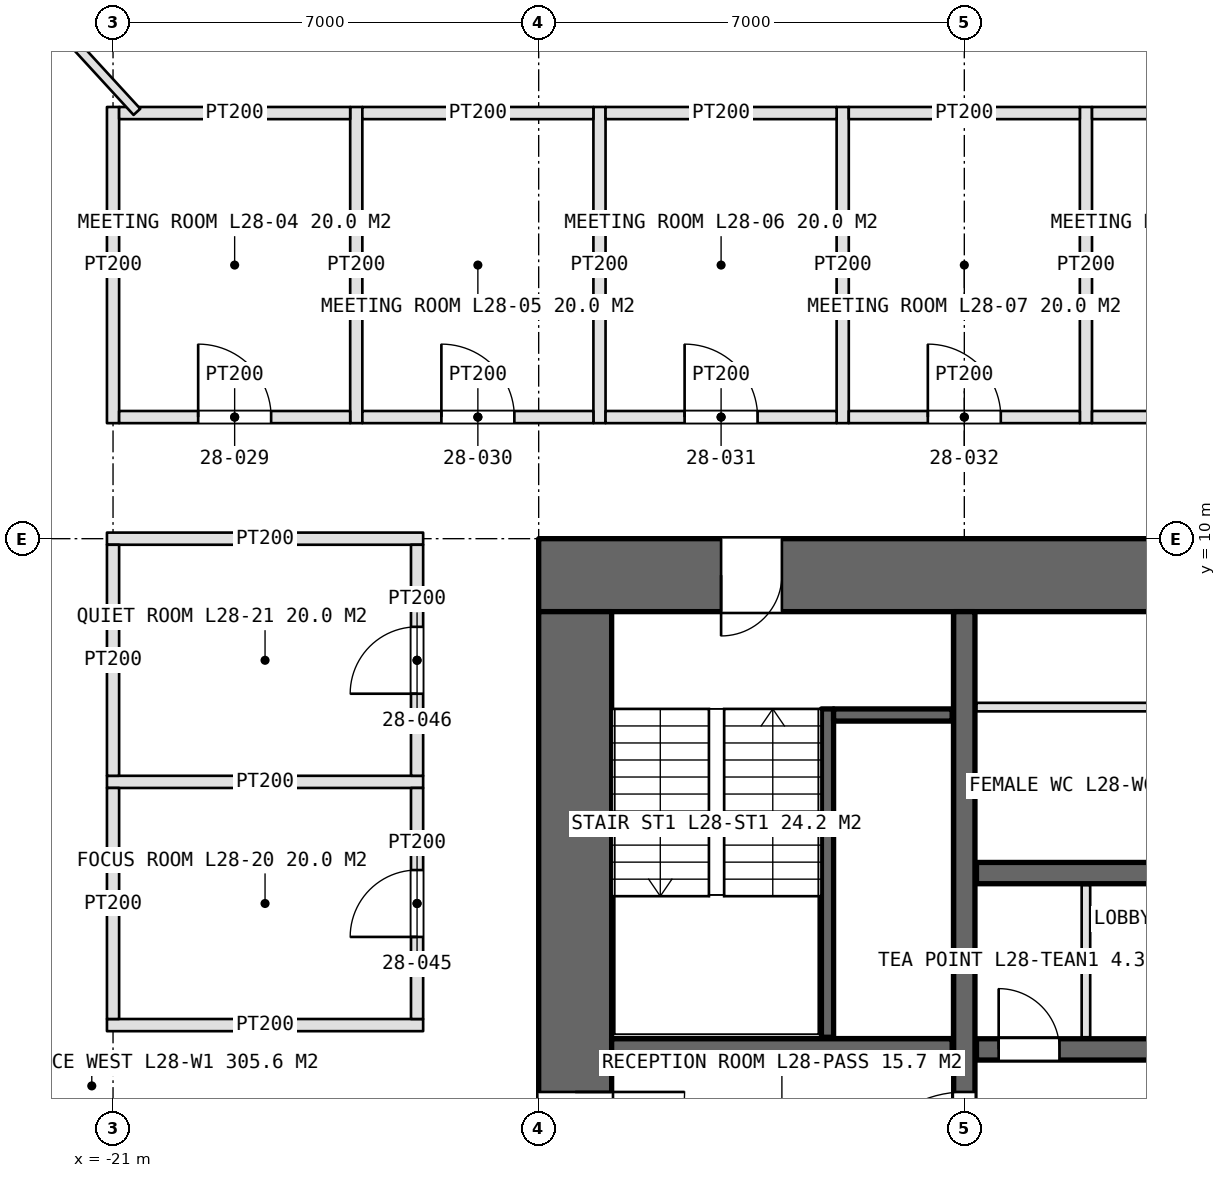
"""IFC4 building model, lengths in metres.
Left out: names, types, materials, properties, quantities, classifications, styles, units other than length and angle.
Written with IfcOpenShell. Run it as: python <this file> out.ifc"""

import sys

from ifc_helpers import new_model, si_unit, direction, frame, frame_2d, origin, place, context, subcontext, project, spatial, rectangle, extrude, element, fill, save


model = new_model("IFC4")
c1 = context("Model", 3, precision=1e-05, world=origin(), true_north=direction((0.0, 1.0)))
c2 = subcontext(c1, "Body", "Model", "MODEL_VIEW")
j1 = project(units=[si_unit("LENGTHUNIT", "METRE"), si_unit("PLANEANGLEUNIT", "RADIAN")], contexts=[c1])
p1 = place(None, origin())
s1 = spatial("IfcSite", under=j1, at=p1, CompositionType="ELEMENT")
p2 = place(p1, origin())
s2 = spatial("IfcBuilding", under=s1, at=p2, CompositionType="ELEMENT")
p3 = place(p2, frame((0.0, 0.0, 134.4)))
s3 = spatial("IfcBuildingStorey", under=s2, at=p3, CompositionType="ELEMENT", Elevation=134.4)
p4 = place(p3, frame((14.0, 9.4, 0.0), z_axis=(0.0, 0.0, 1.0), x_axis=(-1.0, 0.0, 0.0)))
e1 = element("IfcWall", 1, at=p4, inside=s3, PredefinedType="SHEAR", context=c2, shape_type="SweptSolid", body=[
    extrude(rectangle(XDim=28.0, YDim=1.2, at=frame_2d((14.0, 0.0))), origin(), (0.0, 0.0, 1.0), 4.2),
])
p5 = place(p4, frame((24.0, 0.0, 0.0)))
e2 = element("IfcOpeningElement", 2, at=p5, cuts=e1, PredefinedType="OPENING", context=c2, shape_type="SweptSolid", body=[
    extrude(rectangle(XDim=1.0, YDim=2.4, at=frame_2d((0.5, 1.2))), frame((0.0, 0.61, 0.0), z_axis=(0.0, -1.0, 0.0), x_axis=(1.0, 0.0, 0.0)), (0.0, 0.0, 1.0), 1.22),
])
p6 = place(p4, frame((13.1, 0.0, 0.0)))
e3 = element("IfcOpeningElement", 3, at=p6, cuts=e1, PredefinedType="OPENING", context=c2, shape_type="SweptSolid", body=[
    extrude(rectangle(XDim=1.8, YDim=2.4, at=frame_2d((0.9, 1.2))), frame((0.0, 0.61, 0.0), z_axis=(0.0, -1.0, 0.0), x_axis=(1.0, 0.0, 0.0)), (0.0, 0.0, 1.0), 1.22),
])
p7 = place(p3, frame((-13.4, 8.8, 0.0), z_axis=(0.0, 0.0, 1.0), x_axis=(0.0, -1.0, 0.0)))
e4 = element("IfcWall", 4, at=p7, inside=s3, PredefinedType="SHEAR", context=c2, shape_type="SweptSolid", body=[
    extrude(rectangle(XDim=17.6, YDim=1.2, at=frame_2d((8.8, 0.0))), origin(), (0.0, 0.0, 1.0), 4.2),
])
p8 = place(p7, frame((7.9, 0.0, 0.0)))
e5 = element("IfcOpeningElement", 5, at=p8, cuts=e4, PredefinedType="OPENING", context=c2, shape_type="SweptSolid", body=[
    extrude(rectangle(XDim=1.8, YDim=2.4, at=frame_2d((0.9, 1.2))), frame((0.0, 0.61, 0.0), z_axis=(0.0, -1.0, 0.0), x_axis=(1.0, 0.0, 0.0)), (0.0, 0.0, 1.0), 1.22),
])
p9 = place(p7, frame((16.5, 0.0, 0.0)))
e6 = element("IfcOpeningElement", 6, at=p9, cuts=e4, PredefinedType="OPENING", context=c2, shape_type="SweptSolid", body=[
    extrude(rectangle(XDim=1.0, YDim=2.4, at=frame_2d((0.5, 1.2))), frame((0.0, 0.61, 0.0), z_axis=(0.0, -1.0, 0.0), x_axis=(1.0, 0.0, 0.0)), (0.0, 0.0, 1.0), 1.22),
])
p10 = place(p3, frame((-7.0, -8.8, 0.0), z_axis=(0.0, 0.0, 1.0), x_axis=(0.0, 1.0, 0.0)))
e7 = element("IfcWall", 7, at=p10, inside=s3, PredefinedType="SHEAR", context=c2, shape_type="SweptSolid", body=[
    extrude(rectangle(XDim=17.6, YDim=0.35, at=frame_2d((8.8, 0.0))), origin(), (0.0, 0.0, 1.0), 4.2),
])
p11 = place(p10, frame((7.9, 0.0, 0.0)))
e8 = element("IfcOpeningElement", 8, at=p11, cuts=e7, PredefinedType="OPENING", context=c2, shape_type="SweptSolid", body=[
    extrude(rectangle(XDim=1.8, YDim=2.4, at=frame_2d((0.9, 1.2))), frame((0.0, 0.185, 0.0), z_axis=(0.0, -1.0, 0.0), x_axis=(1.0, 0.0, 0.0)), (0.0, 0.0, 1.0), 0.37),
])
p12 = place(p3, frame((-6.8, 1.6, 0.0), z_axis=(0.0, 0.0, 1.0), x_axis=(1.0, 0.0, 0.0)))
e9 = element("IfcWall", 9, at=p12, inside=s3, PredefinedType="SHEAR", context=c2, shape_type="SweptSolid", body=[
    extrude(rectangle(XDim=13.6, YDim=0.35, at=frame_2d((6.8, 0.0))), origin(), (0.0, 0.0, 1.0), 4.2),
])
p13 = place(p12, frame((0.365, 0.0, 0.0)))
e10 = element("IfcOpeningElement", 10, at=p13, cuts=e9, PredefinedType="OPENING", context=c2, shape_type="SweptSolid", body=[
    extrude(rectangle(XDim=1.0, YDim=2.4, at=frame_2d((0.5, 1.2))), frame((0.0, 0.185, 0.0), z_axis=(0.0, -1.0, 0.0), x_axis=(1.0, 0.0, 0.0)), (0.0, 0.0, 1.0), 0.37),
])
p14 = place(p12, frame((4.15, 0.0, 0.0)))
e11 = element("IfcOpeningElement", 11, at=p14, cuts=e9, PredefinedType="OPENING", context=c2, shape_type="SweptSolid", body=[
    extrude(rectangle(XDim=0.9, YDim=2.4, at=frame_2d((0.45, 1.2))), frame((0.0, 0.185, 0.0), z_axis=(0.0, -1.0, 0.0), x_axis=(1.0, 0.0, 0.0)), (0.0, 0.0, 1.0), 0.37),
])
p15 = place(p12, frame((8.635, 0.0, 0.0)))
e12 = element("IfcOpeningElement", 12, at=p15, cuts=e9, PredefinedType="OPENING", context=c2, shape_type="SweptSolid", body=[
    extrude(rectangle(XDim=1.0, YDim=2.4, at=frame_2d((0.5, 1.2))), frame((0.0, 0.185, 0.0), z_axis=(0.0, -1.0, 0.0), x_axis=(1.0, 0.0, 0.0)), (0.0, 0.0, 1.0), 0.37),
])
p16 = place(p3, frame((-6.8, 4.5, 0.0), z_axis=(0.0, 0.0, 1.0), x_axis=(1.0, 0.0, 0.0)))
e13 = element("IfcWall", 13, at=p16, inside=s3, PredefinedType="SHEAR", context=c2, shape_type="SweptSolid", body=[
    extrude(rectangle(XDim=13.6, YDim=0.35, at=frame_2d((6.8, 0.0))), origin(), (0.0, 0.0, 1.0), 4.2),
])
p17 = place(p3, frame((-12.8, 1.6, 0.0), z_axis=(0.0, 0.0, 1.0), x_axis=(1.0, 0.0, 0.0)))
e14 = element("IfcWall", 14, at=p17, inside=s3, PredefinedType="SHEAR", context=c2, shape_type="SweptSolid", body=[
    extrude(rectangle(XDim=5.6, YDim=0.35, at=frame_2d((2.8, 0.0))), origin(), (0.0, 0.0, 1.0), 4.2),
])
p18 = place(p3, frame((-6.8, 7.23, 0.0), z_axis=(0.0, 0.0, 1.0), x_axis=(1.0, 0.0, 0.0)))
e15 = element("IfcWall", 15, at=p18, inside=s3, PredefinedType="PARTITIONING", context=c2, shape_type="SweptSolid", body=[
    extrude(rectangle(XDim=13.6, YDim=0.14, at=frame_2d((6.8, 0.0))), origin(), (0.0, 0.0, 1.0), 3.95),
])
p19 = place(p18, frame((3.28, 0.0, 0.0)))
e16 = element("IfcOpeningElement", 16, at=p19, cuts=e15, PredefinedType="OPENING", context=c2, shape_type="SweptSolid", body=[
    extrude(rectangle(XDim=1.0, YDim=2.4, at=frame_2d((0.5, 1.2))), frame((0.0, 0.08, 0.0), z_axis=(0.0, -1.0, 0.0), x_axis=(1.0, 0.0, 0.0)), (0.0, 0.0, 1.0), 0.16),
])
p20 = place(p18, frame((8.08, 0.0, 0.0)))
e17 = element("IfcOpeningElement", 17, at=p20, cuts=e15, PredefinedType="OPENING", context=c2, shape_type="SweptSolid", body=[
    extrude(rectangle(XDim=1.0, YDim=2.4, at=frame_2d((0.5, 1.2))), frame((0.0, 0.08, 0.0), z_axis=(0.0, -1.0, 0.0), x_axis=(1.0, 0.0, 0.0)), (0.0, 0.0, 1.0), 0.16),
])
p21 = place(p18, frame((12.25, 0.0, 0.0)))
e18 = element("IfcOpeningElement", 18, at=p21, cuts=e15, PredefinedType="OPENING", context=c2, shape_type="SweptSolid", body=[
    extrude(rectangle(XDim=1.1, YDim=2.4, at=frame_2d((0.55, 1.2))), frame((0.0, 0.08, 0.0), z_axis=(0.0, -1.0, 0.0), x_axis=(1.0, 0.0, 0.0)), (0.0, 0.0, 1.0), 0.16),
])
p22 = place(p3, frame((-5.0, 1.8, 0.0), z_axis=(0.0, 0.0, 1.0), x_axis=(0.0, 1.0, 0.0)))
e19 = element("IfcWall", 19, at=p22, inside=s3, PredefinedType="PARTITIONING", context=c2, shape_type="SweptSolid", body=[
    extrude(rectangle(XDim=2.5, YDim=0.14, at=frame_2d((1.25, 0.0))), origin(), (0.0, 0.0, 1.0), 3.95),
])
p23 = place(p3, frame((-9.25, 7.2, 0.0), z_axis=(0.0, 0.0, 1.0), x_axis=(0.0, -1.0, 0.0)))
e20 = element("IfcWall", 20, at=p23, inside=s3, PredefinedType="SOLIDWALL", context=c2, shape_type="SweptSolid", body=[
    extrude(rectangle(XDim=5.4, YDim=0.2, at=frame_2d((2.7, 0.0))), origin(), (0.0, 0.0, 1.0), 4.2),
])
p24 = place(p3, frame((-9.15, 7.1, 0.0), z_axis=(0.0, 0.0, 1.0), x_axis=(1.0, 0.0, 0.0)))
e21 = element("IfcWall", 21, at=p24, inside=s3, PredefinedType="SOLIDWALL", context=c2, shape_type="SweptSolid", body=[
    extrude(rectangle(XDim=1.95, YDim=0.2, at=frame_2d((0.975, 0.0))), origin(), (0.0, 0.0, 1.0), 4.2),
])
for number, where, z_axis, x_axis in (
    (22, (-21.0, 11.9, 0.0), (0.0, 0.0, 1.0), (0.0, 1.0, 0.0)),
    (23, (-17.0, 11.9, 0.0), (0.0, 0.0, 1.0), (0.0, 1.0, 0.0)),
    (24, (-13.0, 11.9, 0.0), (0.0, 0.0, 1.0), (0.0, 1.0, 0.0)),
    (25, (-9.0, 11.9, 0.0), (0.0, 0.0, 1.0), (0.0, 1.0, 0.0)),
    (26, (-5.0, 11.9, 0.0), (0.0, 0.0, 1.0), (0.0, 1.0, 0.0)),
):
    element("IfcWall", number, at=place(p3, frame(where, z_axis=z_axis, x_axis=x_axis)), inside=s3, PredefinedType="PARTITIONING", context=c2, shape_type="SweptSolid", body=[
        extrude(rectangle(XDim=5.2, YDim=0.2, at=frame_2d((2.6, 0.0))), origin(), (0.0, 0.0, 1.0), 3.0),
    ])
p25 = place(p3, frame((-20.9, 12.0, 0.0), z_axis=(0.0, 0.0, 1.0), x_axis=(1.0, 0.0, 0.0)))
e27 = element("IfcWall", 27, at=p25, inside=s3, PredefinedType="PARTITIONING", context=c2, shape_type="SweptSolid", body=[
    extrude(rectangle(XDim=3.8, YDim=0.2, at=frame_2d((1.9, 0.0))), origin(), (0.0, 0.0, 1.0), 3.0),
])
p26 = place(p25, frame((1.3, 0.0, 0.0)))
e28 = element("IfcOpeningElement", 28, at=p26, cuts=e27, PredefinedType="OPENING", context=c2, shape_type="SweptSolid", body=[
    extrude(rectangle(XDim=1.2, YDim=2.4, at=frame_2d((0.6, 1.2))), frame((0.0, 0.11, 0.0), z_axis=(0.0, -1.0, 0.0), x_axis=(1.0, 0.0, 0.0)), (0.0, 0.0, 1.0), 0.22),
])
p27 = place(p3, frame((-20.9, 17.0, 0.0), z_axis=(0.0, 0.0, 1.0), x_axis=(1.0, 0.0, 0.0)))
e29 = element("IfcWall", 29, at=p27, inside=s3, PredefinedType="PARTITIONING", context=c2, shape_type="SweptSolid", body=[
    extrude(rectangle(XDim=3.8, YDim=0.2, at=frame_2d((1.9, 0.0))), origin(), (0.0, 0.0, 1.0), 3.0),
])
p28 = place(p3, frame((-16.9, 12.0, 0.0), z_axis=(0.0, 0.0, 1.0), x_axis=(1.0, 0.0, 0.0)))
e30 = element("IfcWall", 30, at=p28, inside=s3, PredefinedType="PARTITIONING", context=c2, shape_type="SweptSolid", body=[
    extrude(rectangle(XDim=3.8, YDim=0.2, at=frame_2d((1.9, 0.0))), origin(), (0.0, 0.0, 1.0), 3.0),
])
p29 = place(p28, frame((1.3, 0.0, 0.0)))
e31 = element("IfcOpeningElement", 31, at=p29, cuts=e30, PredefinedType="OPENING", context=c2, shape_type="SweptSolid", body=[
    extrude(rectangle(XDim=1.2, YDim=2.4, at=frame_2d((0.6, 1.2))), frame((0.0, 0.11, 0.0), z_axis=(0.0, -1.0, 0.0), x_axis=(1.0, 0.0, 0.0)), (0.0, 0.0, 1.0), 0.22),
])
p30 = place(p3, frame((-16.9, 17.0, 0.0), z_axis=(0.0, 0.0, 1.0), x_axis=(1.0, 0.0, 0.0)))
e32 = element("IfcWall", 32, at=p30, inside=s3, PredefinedType="PARTITIONING", context=c2, shape_type="SweptSolid", body=[
    extrude(rectangle(XDim=3.8, YDim=0.2, at=frame_2d((1.9, 0.0))), origin(), (0.0, 0.0, 1.0), 3.0),
])
p31 = place(p3, frame((-12.9, 12.0, 0.0), z_axis=(0.0, 0.0, 1.0), x_axis=(1.0, 0.0, 0.0)))
e33 = element("IfcWall", 33, at=p31, inside=s3, PredefinedType="PARTITIONING", context=c2, shape_type="SweptSolid", body=[
    extrude(rectangle(XDim=3.8, YDim=0.2, at=frame_2d((1.9, 0.0))), origin(), (0.0, 0.0, 1.0), 3.0),
])
p32 = place(p31, frame((1.3, 0.0, 0.0)))
e34 = element("IfcOpeningElement", 34, at=p32, cuts=e33, PredefinedType="OPENING", context=c2, shape_type="SweptSolid", body=[
    extrude(rectangle(XDim=1.2, YDim=2.4, at=frame_2d((0.6, 1.2))), frame((0.0, 0.11, 0.0), z_axis=(0.0, -1.0, 0.0), x_axis=(1.0, 0.0, 0.0)), (0.0, 0.0, 1.0), 0.22),
])
p33 = place(p3, frame((-12.9, 17.0, 0.0), z_axis=(0.0, 0.0, 1.0), x_axis=(1.0, 0.0, 0.0)))
e35 = element("IfcWall", 35, at=p33, inside=s3, PredefinedType="PARTITIONING", context=c2, shape_type="SweptSolid", body=[
    extrude(rectangle(XDim=3.8, YDim=0.2, at=frame_2d((1.9, 0.0))), origin(), (0.0, 0.0, 1.0), 3.0),
])
p34 = place(p3, frame((-8.9, 12.0, 0.0), z_axis=(0.0, 0.0, 1.0), x_axis=(1.0, 0.0, 0.0)))
e36 = element("IfcWall", 36, at=p34, inside=s3, PredefinedType="PARTITIONING", context=c2, shape_type="SweptSolid", body=[
    extrude(rectangle(XDim=3.8, YDim=0.2, at=frame_2d((1.9, 0.0))), origin(), (0.0, 0.0, 1.0), 3.0),
])
p35 = place(p34, frame((1.3, 0.0, 0.0)))
e37 = element("IfcOpeningElement", 37, at=p35, cuts=e36, PredefinedType="OPENING", context=c2, shape_type="SweptSolid", body=[
    extrude(rectangle(XDim=1.2, YDim=2.4, at=frame_2d((0.6, 1.2))), frame((0.0, 0.11, 0.0), z_axis=(0.0, -1.0, 0.0), x_axis=(1.0, 0.0, 0.0)), (0.0, 0.0, 1.0), 0.22),
])
p36 = place(p3, frame((-8.9, 17.0, 0.0), z_axis=(0.0, 0.0, 1.0), x_axis=(1.0, 0.0, 0.0)))
e38 = element("IfcWall", 38, at=p36, inside=s3, PredefinedType="PARTITIONING", context=c2, shape_type="SweptSolid", body=[
    extrude(rectangle(XDim=3.8, YDim=0.2, at=frame_2d((1.9, 0.0))), origin(), (0.0, 0.0, 1.0), 3.0),
])
p37 = place(p3, frame((-4.9, 12.0, 0.0), z_axis=(0.0, 0.0, 1.0), x_axis=(1.0, 0.0, 0.0)))
e39 = element("IfcWall", 39, at=p37, inside=s3, PredefinedType="PARTITIONING", context=c2, shape_type="SweptSolid", body=[
    extrude(rectangle(XDim=3.8, YDim=0.2, at=frame_2d((1.9, 0.0))), origin(), (0.0, 0.0, 1.0), 3.0),
])
p38 = place(p37, frame((1.3, 0.0, 0.0)))
e40 = element("IfcOpeningElement", 40, at=p38, cuts=e39, PredefinedType="OPENING", context=c2, shape_type="SweptSolid", body=[
    extrude(rectangle(XDim=1.2, YDim=2.4, at=frame_2d((0.6, 1.2))), frame((0.0, 0.11, 0.0), z_axis=(0.0, -1.0, 0.0), x_axis=(1.0, 0.0, 0.0)), (0.0, 0.0, 1.0), 0.22),
])
p39 = place(p3, frame((-4.9, 17.0, 0.0), z_axis=(0.0, 0.0, 1.0), x_axis=(1.0, 0.0, 0.0)))
e41 = element("IfcWall", 41, at=p39, inside=s3, PredefinedType="PARTITIONING", context=c2, shape_type="SweptSolid", body=[
    extrude(rectangle(XDim=3.8, YDim=0.2, at=frame_2d((1.9, 0.0))), origin(), (0.0, 0.0, 1.0), 3.0),
])
for number, where, z_axis, x_axis in (
    (42, (-15.9, 2.0, 0.0), (0.0, 0.0, 1.0), (-1.0, 0.0, 0.0)),
    (43, (-15.9, 6.0, 0.0), (0.0, 0.0, 1.0), (-1.0, 0.0, 0.0)),
    (44, (-15.9, 10.0, 0.0), (0.0, 0.0, 1.0), (-1.0, 0.0, 0.0)),
):
    element("IfcWall", number, at=place(p3, frame(where, z_axis=z_axis, x_axis=x_axis)), inside=s3, PredefinedType="PARTITIONING", context=c2, shape_type="SweptSolid", body=[
        extrude(rectangle(XDim=5.2, YDim=0.2, at=frame_2d((2.6, 0.0))), origin(), (0.0, 0.0, 1.0), 3.0),
    ])
p40 = place(p3, frame((-16.0, 2.1, 0.0), z_axis=(0.0, 0.0, 1.0), x_axis=(0.0, 1.0, 0.0)))
e45 = element("IfcWall", 45, at=p40, inside=s3, PredefinedType="PARTITIONING", context=c2, shape_type="SweptSolid", body=[
    extrude(rectangle(XDim=3.8, YDim=0.2, at=frame_2d((1.9, 0.0))), origin(), (0.0, 0.0, 1.0), 3.0),
])
p41 = place(p40, frame((1.35, 0.0, 0.0)))
e46 = element("IfcOpeningElement", 46, at=p41, cuts=e45, PredefinedType="OPENING", context=c2, shape_type="SweptSolid", body=[
    extrude(rectangle(XDim=1.1, YDim=2.3, at=frame_2d((0.55, 1.15))), frame((0.0, 0.11, 0.0), z_axis=(0.0, -1.0, 0.0), x_axis=(1.0, 0.0, 0.0)), (0.0, 0.0, 1.0), 0.22),
])
p42 = place(p3, frame((-21.0, 2.1, 0.0), z_axis=(0.0, 0.0, 1.0), x_axis=(0.0, 1.0, 0.0)))
e47 = element("IfcWall", 47, at=p42, inside=s3, PredefinedType="PARTITIONING", context=c2, shape_type="SweptSolid", body=[
    extrude(rectangle(XDim=3.8, YDim=0.2, at=frame_2d((1.9, 0.0))), origin(), (0.0, 0.0, 1.0), 3.0),
])
p43 = place(p3, frame((-16.0, 6.1, 0.0), z_axis=(0.0, 0.0, 1.0), x_axis=(0.0, 1.0, 0.0)))
e48 = element("IfcWall", 48, at=p43, inside=s3, PredefinedType="PARTITIONING", context=c2, shape_type="SweptSolid", body=[
    extrude(rectangle(XDim=3.8, YDim=0.2, at=frame_2d((1.9, 0.0))), origin(), (0.0, 0.0, 1.0), 3.0),
])
p44 = place(p43, frame((1.35, 0.0, 0.0)))
e49 = element("IfcOpeningElement", 49, at=p44, cuts=e48, PredefinedType="OPENING", context=c2, shape_type="SweptSolid", body=[
    extrude(rectangle(XDim=1.1, YDim=2.3, at=frame_2d((0.55, 1.15))), frame((0.0, 0.11, 0.0), z_axis=(0.0, -1.0, 0.0), x_axis=(1.0, 0.0, 0.0)), (0.0, 0.0, 1.0), 0.22),
])
p45 = place(p3, frame((-21.0, 6.1, 0.0), z_axis=(0.0, 0.0, 1.0), x_axis=(0.0, 1.0, 0.0)))
e50 = element("IfcWall", 50, at=p45, inside=s3, PredefinedType="PARTITIONING", context=c2, shape_type="SweptSolid", body=[
    extrude(rectangle(XDim=3.8, YDim=0.2, at=frame_2d((1.9, 0.0))), origin(), (0.0, 0.0, 1.0), 3.0),
])
p46 = place(p3, frame((-20.607, 17.02, 0.0), z_axis=(0.0, 0.0, 1.0), x_axis=(-0.676173993609, 0.736741970005, 0.0)))
e51 = element("IfcWall", 51, at=p46, inside=s3, PredefinedType="PARTITIONING", context=c2, shape_type="SweptSolid", body=[
    extrude(rectangle(XDim=4.107, YDim=0.15, at=frame_2d((2.054, 0.0))), origin(), (0.0, 0.0, 1.0), 3.0),
])
p47 = place(p8, origin())
e52 = element("IfcDoor", 52, at=p47, inside=s3, OperationType="DOUBLE_DOOR_SINGLE_SWING", PredefinedType="DOOR", context=c2, shape_type="SweptSolid", body=[
    extrude(rectangle(XDim=1.8, YDim=2.4, at=frame_2d((0.9, 1.2))), frame((0.0, 0.025, 0.0), z_axis=(0.0, -1.0, 0.0), x_axis=(1.0, 0.0, 0.0)), (0.0, 0.0, 1.0), 0.05),
])
fill(e5, e52)
p48 = place(p11, origin())
e53 = element("IfcDoor", 53, at=p48, inside=s3, OperationType="DOUBLE_DOOR_SINGLE_SWING", PredefinedType="DOOR", context=c2, shape_type="SweptSolid", body=[
    extrude(rectangle(XDim=1.8, YDim=2.4, at=frame_2d((0.9, 1.2))), frame((0.0, 0.025, 0.0), z_axis=(0.0, -1.0, 0.0), x_axis=(1.0, 0.0, 0.0)), (0.0, 0.0, 1.0), 0.05),
])
fill(e8, e53)
p49 = place(p5, origin())
e54 = element("IfcDoor", 54, at=p49, inside=s3, OperationType="SINGLE_SWING_RIGHT", PredefinedType="DOOR", context=c2, shape_type="SweptSolid", body=[
    extrude(rectangle(XDim=1.0, YDim=2.4, at=frame_2d((0.5, 1.2))), frame((0.0, 0.025, 0.0), z_axis=(0.0, -1.0, 0.0), x_axis=(1.0, 0.0, 0.0)), (0.0, 0.0, 1.0), 0.05),
])
fill(e2, e54)
p50 = place(p13, origin())
e55 = element("IfcDoor", 55, at=p50, inside=s3, OperationType="SINGLE_SWING_LEFT", PredefinedType="DOOR", context=c2, shape_type="SweptSolid", body=[
    extrude(rectangle(XDim=1.0, YDim=2.4, at=frame_2d((0.5, 1.2))), frame((0.0, 0.025, 0.0), z_axis=(0.0, -1.0, 0.0), x_axis=(1.0, 0.0, 0.0)), (0.0, 0.0, 1.0), 0.05),
])
fill(e10, e55)
p51 = place(p26, origin())
e56 = element("IfcDoor", 56, at=p51, inside=s3, OperationType="SINGLE_SWING_LEFT", PredefinedType="DOOR", context=c2, shape_type="SweptSolid", body=[
    extrude(rectangle(XDim=1.2, YDim=2.4, at=frame_2d((0.6, 1.2))), frame((0.0, 0.025, 0.0), z_axis=(0.0, -1.0, 0.0), x_axis=(1.0, 0.0, 0.0)), (0.0, 0.0, 1.0), 0.05),
])
fill(e28, e56)
p52 = place(p29, origin())
e57 = element("IfcDoor", 57, at=p52, inside=s3, OperationType="SINGLE_SWING_LEFT", PredefinedType="DOOR", context=c2, shape_type="SweptSolid", body=[
    extrude(rectangle(XDim=1.2, YDim=2.4, at=frame_2d((0.6, 1.2))), frame((0.0, 0.025, 0.0), z_axis=(0.0, -1.0, 0.0), x_axis=(1.0, 0.0, 0.0)), (0.0, 0.0, 1.0), 0.05),
])
fill(e31, e57)
p53 = place(p32, origin())
e58 = element("IfcDoor", 58, at=p53, inside=s3, OperationType="SINGLE_SWING_LEFT", PredefinedType="DOOR", context=c2, shape_type="SweptSolid", body=[
    extrude(rectangle(XDim=1.2, YDim=2.4, at=frame_2d((0.6, 1.2))), frame((0.0, 0.025, 0.0), z_axis=(0.0, -1.0, 0.0), x_axis=(1.0, 0.0, 0.0)), (0.0, 0.0, 1.0), 0.05),
])
fill(e34, e58)
p54 = place(p35, origin())
e59 = element("IfcDoor", 59, at=p54, inside=s3, OperationType="SINGLE_SWING_LEFT", PredefinedType="DOOR", context=c2, shape_type="SweptSolid", body=[
    extrude(rectangle(XDim=1.2, YDim=2.4, at=frame_2d((0.6, 1.2))), frame((0.0, 0.025, 0.0), z_axis=(0.0, -1.0, 0.0), x_axis=(1.0, 0.0, 0.0)), (0.0, 0.0, 1.0), 0.05),
])
fill(e37, e59)
p55 = place(p41, origin())
e60 = element("IfcDoor", 60, at=p55, inside=s3, OperationType="SINGLE_SWING_LEFT", PredefinedType="DOOR", context=c2, shape_type="SweptSolid", body=[
    extrude(rectangle(XDim=1.1, YDim=2.3, at=frame_2d((0.55, 1.15))), frame((0.0, 0.025, 0.0), z_axis=(0.0, -1.0, 0.0), x_axis=(1.0, 0.0, 0.0)), (0.0, 0.0, 1.0), 0.05),
])
fill(e46, e60)
p56 = place(p44, origin())
e61 = element("IfcDoor", 61, at=p56, inside=s3, OperationType="SINGLE_SWING_LEFT", PredefinedType="DOOR", context=c2, shape_type="SweptSolid", body=[
    extrude(rectangle(XDim=1.1, YDim=2.3, at=frame_2d((0.55, 1.15))), frame((0.0, 0.025, 0.0), z_axis=(0.0, -1.0, 0.0), x_axis=(1.0, 0.0, 0.0)), (0.0, 0.0, 1.0), 0.05),
])
fill(e49, e61)
save(model, sys.argv[1])
